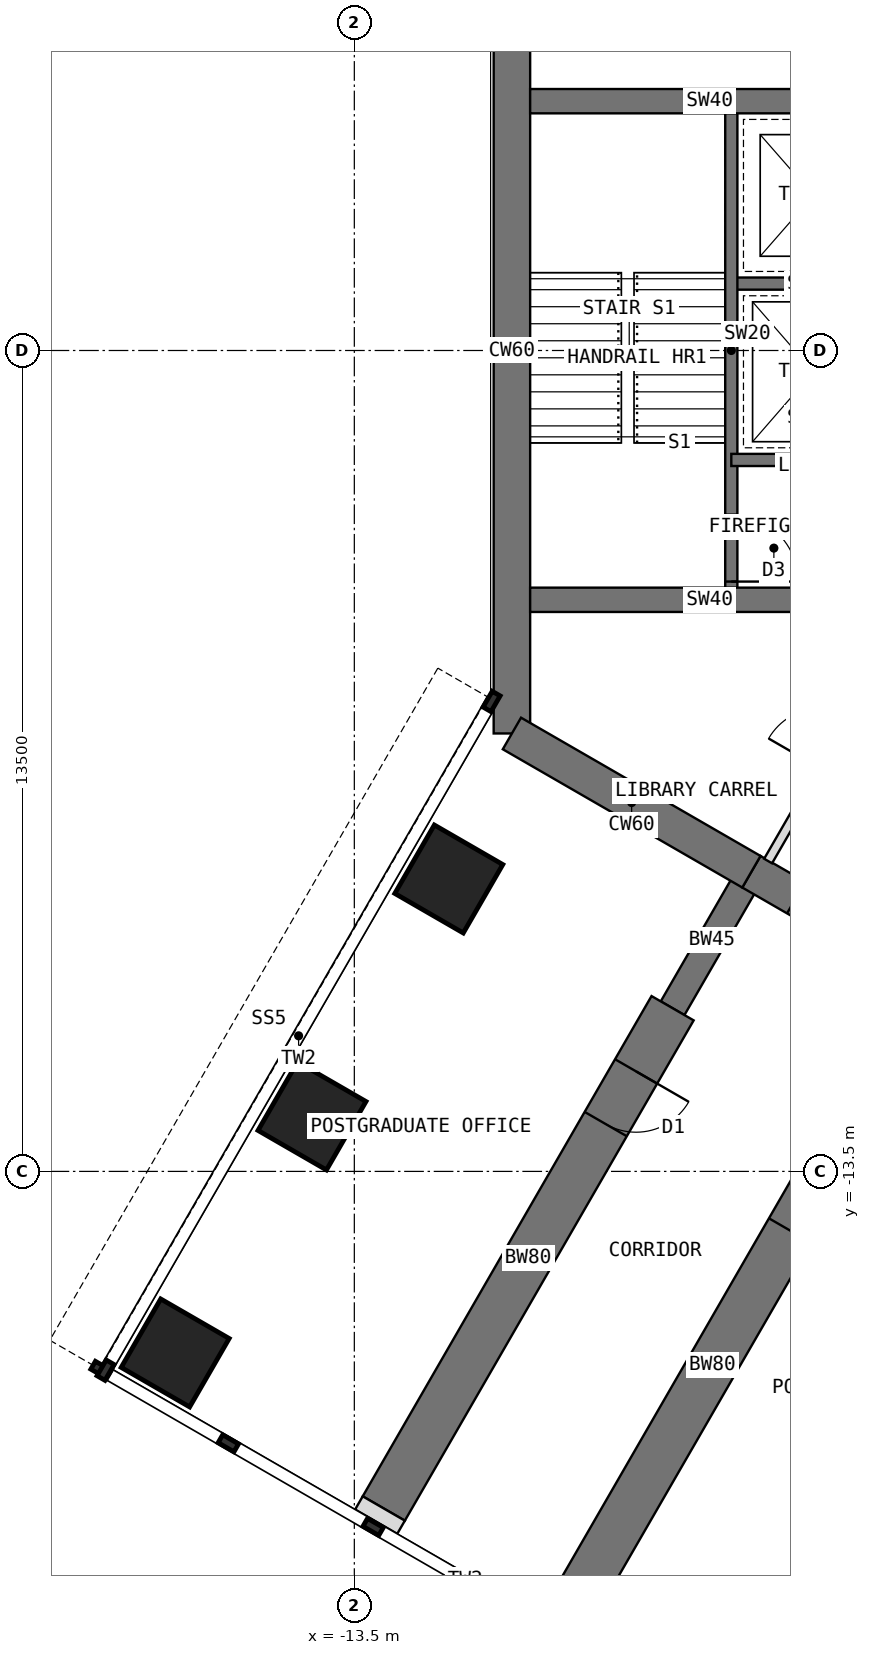
"""IFC4 building model, lengths in metres.
Left out: names, types, materials, properties, quantities, classifications, styles, units other than length and angle.
Written with IfcOpenShell. Run it as: python <this file> out.ifc"""

import sys

from ifc_helpers import new_model, si_unit, direction, frame, frame_2d, origin, origin_2d, place, context, subcontext, project, spatial, rectangle, extrude, element, fill, save


model = new_model("IFC4")
c1 = context("Model", 3, precision=1e-05, world=origin(), true_north=direction((0.0, 1.0)))
c2 = subcontext(c1, "Body", "Model", "MODEL_VIEW")
j1 = project(units=[si_unit("LENGTHUNIT", "METRE"), si_unit("PLANEANGLEUNIT", "RADIAN")], contexts=[c1])
p1 = place(None, origin())
s1 = spatial("IfcSite", under=j1, at=p1, CompositionType="ELEMENT")
p2 = place(p1, origin())
s2 = spatial("IfcBuilding", under=s1, at=p2, CompositionType="ELEMENT")
p3 = place(p2, frame((0.0, 0.0, 125.5)))
s3 = spatial("IfcBuildingStorey", under=s2, at=p3, CompositionType="ELEMENT", Elevation=125.5)
p4 = place(p3, frame((-10.908, 6.298, 0.0), z_axis=(0.0, 0.0, 1.0), x_axis=(0.0, -1.0, 0.0)))
e1 = element("IfcWall", 1, at=p4, inside=s3, PredefinedType="SHEAR", context=c2, shape_type="SweptSolid", body=[
    extrude(rectangle(XDim=12.596, YDim=0.6, at=frame_2d((6.298, 0.0))), origin(), (0.0, 0.0, 1.0), 4.0),
])
p5 = place(p3, frame((-10.908, -6.298, 0.0), z_axis=(0.0, 0.0, 1.0), x_axis=(0.866034513004, -0.499984222037, 0.0)))
e2 = element("IfcWall", 2, at=p5, inside=s3, PredefinedType="SHEAR", context=c2, shape_type="SweptSolid", body=[
    extrude(rectangle(XDim=4.548, YDim=0.6, at=frame_2d((2.274, 0.0))), origin(), (0.0, 0.0, 1.0), 4.0),
])
p6 = place(p3, frame((-6.97, -8.572, 0.0), z_axis=(0.0, 0.0, 1.0), x_axis=(0.866019471182, -0.500010275428, 0.0)))
e3 = element("IfcWall", 3, at=p6, inside=s3, PredefinedType="SHEAR", context=c2, shape_type="SweptSolid", body=[
    extrude(rectangle(XDim=3.5, YDim=0.6, at=frame_2d((1.75, 0.0))), origin(), (0.0, 0.0, 1.0), 4.0),
])
p7 = place(p6, frame((0.85, 0.0, 0.0)))
e4 = element("IfcOpeningElement", 4, at=p7, cuts=e3, PredefinedType="OPENING", context=c2, shape_type="SweptSolid", body=[
    extrude(rectangle(XDim=1.8, YDim=2.1, at=frame_2d((0.9, 1.05))), frame((0.0, 0.31, 0.0), z_axis=(0.0, -1.0, 0.0), x_axis=(1.0, 0.0, 0.0)), (0.0, 0.0, 1.0), 0.62),
])
p8 = place(p3, frame((-5.234, -12.566, 0.0), z_axis=(0.0, 0.0, 1.0), x_axis=(-0.499997557548, -0.86602681393, 0.0)))
e5 = element("IfcWall", 5, at=p8, inside=s3, PredefinedType="SHEAR", context=c2, shape_type="SweptSolid", body=[
    extrude(rectangle(XDim=9.5, YDim=0.8, at=frame_2d((4.75, 0.0))), origin(), (0.0, 0.0, 1.0), 4.0),
])
p9 = place(p8, frame((1.2, 0.0, 0.0)))
e6 = element("IfcOpeningElement", 6, at=p9, cuts=e5, PredefinedType="OPENING", context=c2, shape_type="SweptSolid", body=[
    extrude(rectangle(XDim=1.0, YDim=2.1, at=frame_2d((0.5, 1.05))), frame((0.0, 0.41, 0.0), z_axis=(0.0, -1.0, 0.0), x_axis=(1.0, 0.0, 0.0)), (0.0, 0.0, 1.0), 0.82),
])
p10 = place(p3, frame((-6.97, -8.572, 0.0), z_axis=(0.0, 0.0, 1.0), x_axis=(-0.499988811324, -0.866031863473, 0.0)))
e7 = element("IfcWall", 7, at=p10, inside=s3, PredefinedType="SHEAR", context=c2, shape_type="SweptSolid", body=[
    extrude(rectangle(XDim=2.592, YDim=0.45, at=frame_2d((1.296, 0.0))), origin(), (0.0, 0.0, 1.0), 4.0),
])
p11 = place(p3, frame((-8.266, -10.816, 0.0), z_axis=(0.0, 0.0, 1.0), x_axis=(-0.499997557548, -0.86602681393, 0.0)))
e8 = element("IfcWall", 8, at=p11, inside=s3, PredefinedType="SHEAR", context=c2, shape_type="SweptSolid", body=[
    extrude(rectangle(XDim=9.5, YDim=0.8, at=frame_2d((4.75, 0.0))), origin(), (0.0, 0.0, 1.0), 4.0),
])
p12 = place(p11, frame((1.2, 0.0, 0.0)))
e9 = element("IfcOpeningElement", 9, at=p12, cuts=e8, PredefinedType="OPENING", context=c2, shape_type="SweptSolid", body=[
    extrude(rectangle(XDim=1.0, YDim=2.1, at=frame_2d((0.5, 1.05))), frame((0.0, 0.41, 0.0), z_axis=(0.0, -1.0, 0.0), x_axis=(1.0, 0.0, 0.0)), (0.0, 0.0, 1.0), 0.82),
])
for number, where, z_axis, x_axis in (
    (10, (-11.946, -8.691, 0.0), (0.0, 0.0, 1.0), (0.5, 0.866, 0.0)),
    (11, (-14.196, -12.588, 0.0), (0.0, 0.0, 1.0), (0.5, 0.866, 0.0)),
    (12, (-16.446, -16.486, 0.0), (0.0, 0.0, 1.0), (0.5, 0.866, 0.0)),
):
    element("IfcColumn", number, at=place(p3, frame(where, z_axis=z_axis, x_axis=x_axis)), inside=s3, PredefinedType="COLUMN", context=c2, shape_type="SweptSolid", body=[
        extrude(rectangle(XDim=1.3, YDim=1.3, at=origin_2d()), origin(), (0.0, 0.0, 1.0), 4.0),
    ])
p13 = place(p3, frame((-13.016, -19.044, 0.0), z_axis=(0.0, 0.0, 1.0), x_axis=(-0.500342721131, -0.865827443207, 0.0)))
e13 = element("IfcWall", 13, at=p13, inside=s3, PredefinedType="PARTITIONING", context=c2, shape_type="SweptSolid", body=[
    extrude(rectangle(XDim=0.25, YDim=0.8, at=frame_2d((0.125, 0.0))), origin(), (0.0, 0.0, 1.0), 3.8),
])
p14 = place(p3, frame((-4.7, 1.1, 0.0), z_axis=(0.0, 0.0, 1.0), x_axis=(-1.0, 0.0, 0.0)))
e14 = element("IfcWall", 14, at=p14, inside=s3, PredefinedType="SHEAR", context=c2, shape_type="SweptSolid", body=[
    extrude(rectangle(XDim=2.6, YDim=0.2, at=frame_2d((1.3, 0.0))), origin(), (0.0, 0.0, 1.0), 4.0),
])
p15 = place(p3, frame((-4.7, -1.8, 0.0), z_axis=(0.0, 0.0, 1.0), x_axis=(-1.0, 0.0, 0.0)))
e15 = element("IfcWall", 15, at=p15, inside=s3, PredefinedType="SHEAR", context=c2, shape_type="SweptSolid", body=[
    extrude(rectangle(XDim=2.6, YDim=0.2, at=frame_2d((1.3, 0.0))), origin(), (0.0, 0.0, 1.0), 4.0),
])
p16 = place(p15, frame((0.55, 0.0, 0.0)))
e16 = element("IfcOpeningElement", 16, at=p16, cuts=e15, PredefinedType="OPENING", context=c2, shape_type="SweptSolid", body=[
    extrude(rectangle(XDim=1.3, YDim=2.2, at=frame_2d((0.65, 1.1))), frame((0.0, 0.11, 0.0), z_axis=(0.0, -1.0, 0.0), x_axis=(1.0, 0.0, 0.0)), (0.0, 0.0, 1.0), 0.22),
])
p17 = place(p3, frame((-7.3, 4.0, 0.0), z_axis=(0.0, 0.0, 1.0), x_axis=(0.0, -1.0, 0.0)))
e17 = element("IfcWall", 17, at=p17, inside=s3, PredefinedType="SHEAR", context=c2, shape_type="SweptSolid", body=[
    extrude(rectangle(XDim=8.0, YDim=0.2, at=frame_2d((4.0, 0.0))), origin(), (0.0, 0.0, 1.0), 4.0),
])
p18 = place(p17, frame((6.7, 0.0, 0.0)))
e18 = element("IfcOpeningElement", 18, at=p18, cuts=e17, PredefinedType="OPENING", context=c2, shape_type="SweptSolid", body=[
    extrude(rectangle(XDim=1.1, YDim=2.1, at=frame_2d((0.55, 1.05))), frame((0.0, 0.11, 0.0), z_axis=(0.0, -1.0, 0.0), x_axis=(1.0, 0.0, 0.0)), (0.0, 0.0, 1.0), 0.22),
])
for number, where, z_axis, x_axis in (
    (19, (-4.7, -4.1, 0.0), (0.0, 0.0, 1.0), (-1.0, 0.0, 0.0)),
    (20, (-4.7, 4.1, 0.0), (0.0, 0.0, 1.0), (-1.0, 0.0, 0.0)),
):
    element("IfcWall", number, at=place(p3, frame(where, z_axis=z_axis, x_axis=x_axis)), inside=s3, PredefinedType="SHEAR", context=c2, shape_type="SweptSolid", body=[
        extrude(rectangle(XDim=5.908, YDim=0.4, at=frame_2d((2.954, 0.0))), origin(), (0.0, 0.0, 1.0), 4.0),
    ])
p19 = place(p3, frame((-6.695, -8.396, 0.0), z_axis=(0.0, 0.0, 1.0), x_axis=(0.500009315796, 0.86602002524, 0.0)))
e21 = element("IfcWall", 21, at=p19, inside=s3, PredefinedType="PARTITIONING", context=c2, shape_type="SweptSolid", body=[
    extrude(rectangle(XDim=4.519, YDim=0.15, at=frame_2d((2.259, 0.0))), origin(), (0.0, 0.0, 1.0), 3.8),
])
p20 = place(p19, frame((1.749, 0.0, 0.0)))
e22 = element("IfcOpeningElement", 22, at=p20, cuts=e21, PredefinedType="OPENING", context=c2, shape_type="SweptSolid", body=[
    extrude(rectangle(XDim=1.0, YDim=2.1, at=frame_2d((0.5, 1.05))), frame((0.0, 0.085, 0.0), z_axis=(0.0, -1.0, 0.0), x_axis=(1.0, 0.0, 0.0)), (0.0, 0.0, 1.0), 0.17),
])
p21 = place(p3, frame((-4.436, 4.483, 0.0), z_axis=(0.0, 0.0, 1.0), x_axis=(-0.500009315796, 0.86602002524, 0.0)))
e23 = element("IfcWall", 23, at=p21, inside=s3, PredefinedType="PARTITIONING", context=c2, shape_type="SweptSolid", body=[
    extrude(rectangle(XDim=4.519, YDim=0.15, at=frame_2d((2.259, 0.0))), origin(), (0.0, 0.0, 1.0), 3.8),
])
p22 = place(p21, frame((1.769, 0.0, 0.0)))
e24 = element("IfcOpeningElement", 24, at=p22, cuts=e23, PredefinedType="OPENING", context=c2, shape_type="SweptSolid", body=[
    extrude(rectangle(XDim=1.0, YDim=2.1, at=frame_2d((0.5, 1.05))), frame((0.0, 0.085, 0.0), z_axis=(0.0, -1.0, 0.0), x_axis=(1.0, 0.0, 0.0)), (0.0, 0.0, 1.0), 0.17),
])
p23 = place(p16, origin())
e25 = element("IfcDoor", 25, at=p23, inside=s3, OperationType="DOUBLE_DOOR_SLIDING", PredefinedType="DOOR", context=c2, shape_type="SweptSolid", body=[
    extrude(rectangle(XDim=1.3, YDim=2.2, at=frame_2d((0.65, 1.1))), frame((0.0, 0.025, 0.0), z_axis=(0.0, -1.0, 0.0), x_axis=(1.0, 0.0, 0.0)), (0.0, 0.0, 1.0), 0.05),
])
fill(e16, e25)
p24 = place(p18, origin())
e26 = element("IfcDoor", 26, at=p24, inside=s3, OperationType="SINGLE_SWING_RIGHT", PredefinedType="DOOR", context=c2, shape_type="SweptSolid", body=[
    extrude(rectangle(XDim=1.1, YDim=2.1, at=frame_2d((0.55, 1.05))), frame((0.0, 0.025, 0.0), z_axis=(0.0, -1.0, 0.0), x_axis=(1.0, 0.0, 0.0)), (0.0, 0.0, 1.0), 0.05),
])
fill(e18, e26)
p25 = place(p7, origin())
e27 = element("IfcDoor", 27, at=p25, inside=s3, OperationType="DOUBLE_DOOR_DOUBLE_SWING", PredefinedType="DOOR", context=c2, shape_type="SweptSolid", body=[
    extrude(rectangle(XDim=1.72, YDim=2.06, at=frame_2d((0.9, 1.03))), frame((0.0, 0.025, 0.0), z_axis=(0.0, -1.0, 0.0), x_axis=(1.0, 0.0, 0.0)), (0.0, 0.0, 1.0), 0.05),
    extrude(rectangle(XDim=0.04, YDim=2.1, at=frame_2d((0.02, 1.05))), frame((0.0, 0.3, 0.0), z_axis=(0.0, -1.0, 0.0), x_axis=(1.0, 0.0, 0.0)), (0.0, 0.0, 1.0), 0.6),
    extrude(rectangle(XDim=0.04, YDim=2.1, at=frame_2d((1.78, 1.05))), frame((0.0, 0.3, 0.0), z_axis=(0.0, -1.0, 0.0), x_axis=(1.0, 0.0, 0.0)), (0.0, 0.0, 1.0), 0.6),
    extrude(rectangle(XDim=1.72, YDim=0.04, at=frame_2d((0.9, 2.08))), frame((0.0, 0.3, 0.0), z_axis=(0.0, -1.0, 0.0), x_axis=(1.0, 0.0, 0.0)), (0.0, 0.0, 1.0), 0.6),
])
fill(e4, e27)
p26 = place(p9, origin())
e28 = element("IfcDoor", 28, at=p26, inside=s3, OperationType="SINGLE_SWING_LEFT", PredefinedType="DOOR", context=c2, shape_type="SweptSolid", body=[
    extrude(rectangle(XDim=0.92, YDim=2.06, at=frame_2d((0.5, 1.03))), frame((0.0, 0.025, 0.0), z_axis=(0.0, -1.0, 0.0), x_axis=(1.0, 0.0, 0.0)), (0.0, 0.0, 1.0), 0.05),
    extrude(rectangle(XDim=0.04, YDim=2.1, at=frame_2d((0.02, 1.05))), frame((0.0, 0.4, 0.0), z_axis=(0.0, -1.0, 0.0), x_axis=(1.0, 0.0, 0.0)), (0.0, 0.0, 1.0), 0.8),
    extrude(rectangle(XDim=0.04, YDim=2.1, at=frame_2d((0.98, 1.05))), frame((0.0, 0.4, 0.0), z_axis=(0.0, -1.0, 0.0), x_axis=(1.0, 0.0, 0.0)), (0.0, 0.0, 1.0), 0.8),
    extrude(rectangle(XDim=0.92, YDim=0.04, at=frame_2d((0.5, 2.08))), frame((0.0, 0.4, 0.0), z_axis=(0.0, -1.0, 0.0), x_axis=(1.0, 0.0, 0.0)), (0.0, 0.0, 1.0), 0.8),
])
fill(e6, e28)
p27 = place(p12, origin())
e29 = element("IfcDoor", 29, at=p27, inside=s3, OperationType="SINGLE_SWING_LEFT", PredefinedType="DOOR", context=c2, shape_type="SweptSolid", body=[
    extrude(rectangle(XDim=0.92, YDim=2.06, at=frame_2d((0.5, 1.03))), frame((0.0, 0.025, 0.0), z_axis=(0.0, -1.0, 0.0), x_axis=(1.0, 0.0, 0.0)), (0.0, 0.0, 1.0), 0.05),
    extrude(rectangle(XDim=0.04, YDim=2.1, at=frame_2d((0.02, 1.05))), frame((0.0, 0.4, 0.0), z_axis=(0.0, -1.0, 0.0), x_axis=(1.0, 0.0, 0.0)), (0.0, 0.0, 1.0), 0.8),
    extrude(rectangle(XDim=0.04, YDim=2.1, at=frame_2d((0.98, 1.05))), frame((0.0, 0.4, 0.0), z_axis=(0.0, -1.0, 0.0), x_axis=(1.0, 0.0, 0.0)), (0.0, 0.0, 1.0), 0.8),
    extrude(rectangle(XDim=0.92, YDim=0.04, at=frame_2d((0.5, 2.08))), frame((0.0, 0.4, 0.0), z_axis=(0.0, -1.0, 0.0), x_axis=(1.0, 0.0, 0.0)), (0.0, 0.0, 1.0), 0.8),
])
fill(e9, e29)
save(model, sys.argv[1])
